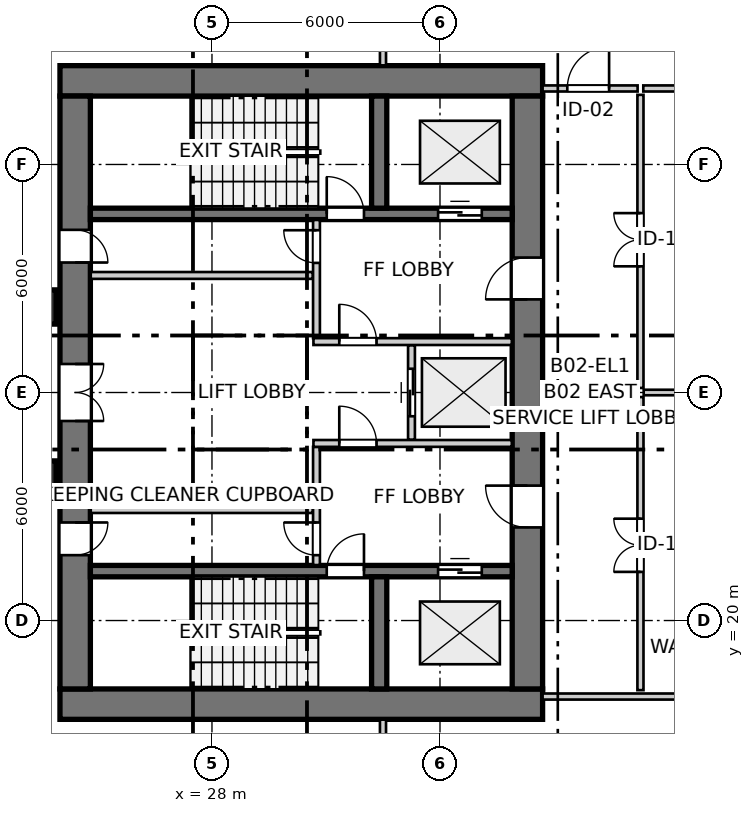
"""IFC4 building model, lengths in metres.
Left out: names, types, materials, properties, quantities, classifications, styles, units other than length and angle.
Written with IfcOpenShell. Run it as: python <this file> out.ifc"""

import sys

from ifc_helpers import new_model, si_unit, direction, frame, frame_2d, origin, origin_2d, place, context, subcontext, project, spatial, rectangle, extrude, source, transform, mapped, element, fill, save


model = new_model("IFC4")
c1 = context("Model", 3, precision=1e-05, world=origin(), true_north=direction((0.0, 1.0)))
c2 = subcontext(c1, "Body", "Model", "MODEL_VIEW")
j1 = project(units=[si_unit("LENGTHUNIT", "METRE"), si_unit("PLANEANGLEUNIT", "RADIAN")], contexts=[c1])
p1 = place(None, origin())
s1 = spatial("IfcSite", under=j1, at=p1, CompositionType="ELEMENT")
p2 = place(p1, origin())
s2 = spatial("IfcBuilding", under=s1, at=p2, CompositionType="ELEMENT")
p3 = place(p2, frame((0.0, 0.0, -8.7)))
s3 = spatial("IfcBuildingStorey", under=s2, at=p3, CompositionType="ELEMENT", Elevation=-8.7)
m1 = source(origin(), c2, "Body", "SweptSolid", [
    extrude(rectangle(XDim=0.9, YDim=0.9, at=origin_2d()), origin(), (0.0, 0.0, 1.0), 4.2),
])
for number, where, z_axis, x_axis in (
    (1, (23.45, 23.75, 0.0), (0.0, 0.0, 1.0), (1.0, 0.0, 0.0)),
    (2, (23.45, 28.25, 0.0), (0.0, 0.0, 1.0), (1.0, 0.0, 0.0)),
):
    element("IfcColumn", number, at=place(p3, frame(where, z_axis=z_axis, x_axis=x_axis)), inside=s3, PredefinedType="COLUMN", context=c2, shape_type="MappedRepresentation", body=[
        mapped(m1, transform((0.0, 0.0, 0.0), x_axis=(1.0, 0.0, 0.0), y_axis=(0.0, 1.0, 0.0), z_axis=(0.0, 0.0, 1.0), scale=1.0)),
    ])
for number, where, z_axis, x_axis in (
    (3, (24.0, 17.8, 0.0), (0.0, 0.0, 1.0), (1.0, 0.0, 0.0)),
    (4, (36.7, 34.2, 0.0), (0.0, 0.0, 1.0), (-1.0, 0.0, 0.0)),
):
    element("IfcWall", number, at=place(p3, frame(where, z_axis=z_axis, x_axis=x_axis)), inside=s3, PredefinedType="SHEAR", context=c2, shape_type="SweptSolid", body=[
        extrude(rectangle(XDim=12.7, YDim=0.8, at=frame_2d((6.35, 0.0))), origin(), (0.0, 0.0, 1.0), 4.2),
    ])
p4 = place(p3, frame((24.4, 33.8, 0.0), z_axis=(0.0, 0.0, 1.0), x_axis=(0.0, -1.0, 0.0)))
e5 = element("IfcWall", 5, at=p4, inside=s3, PredefinedType="SHEAR", context=c2, shape_type="SweptSolid", body=[
    extrude(rectangle(XDim=15.6, YDim=0.8, at=frame_2d((7.8, 0.0))), origin(), (0.0, 0.0, 1.0), 4.2),
])
p5 = place(p4, frame((7.05, 0.0, 0.0)))
e6 = element("IfcOpeningElement", 6, at=p5, cuts=e5, PredefinedType="OPENING", context=c2, shape_type="SweptSolid", body=[
    extrude(rectangle(XDim=1.5, YDim=2.15, at=frame_2d((0.75, 1.075))), frame((0.0, 0.41, 0.0), z_axis=(0.0, -1.0, 0.0), x_axis=(1.0, 0.0, 0.0)), (0.0, 0.0, 1.0), 0.82),
])
p6 = place(p4, frame((3.52, 0.0, 0.0)))
e7 = element("IfcOpeningElement", 7, at=p6, cuts=e5, PredefinedType="OPENING", context=c2, shape_type="SweptSolid", body=[
    extrude(rectangle(XDim=0.86, YDim=2.05, at=frame_2d((0.43, 1.025))), frame((0.0, 0.41, 0.0), z_axis=(0.0, -1.0, 0.0), x_axis=(1.0, 0.0, 0.0)), (0.0, 0.0, 1.0), 0.82),
])
p7 = place(p4, frame((11.22, 0.0, 0.0)))
e8 = element("IfcOpeningElement", 8, at=p7, cuts=e5, PredefinedType="OPENING", context=c2, shape_type="SweptSolid", body=[
    extrude(rectangle(XDim=0.86, YDim=2.05, at=frame_2d((0.43, 1.025))), frame((0.0, 0.41, 0.0), z_axis=(0.0, -1.0, 0.0), x_axis=(1.0, 0.0, 0.0)), (0.0, 0.0, 1.0), 0.82),
])
p8 = place(p3, frame((36.3, 18.2, 0.0), z_axis=(0.0, 0.0, 1.0), x_axis=(0.0, 1.0, 0.0)))
e9 = element("IfcWall", 9, at=p8, inside=s3, PredefinedType="SHEAR", context=c2, shape_type="SweptSolid", body=[
    extrude(rectangle(XDim=15.6, YDim=0.8, at=frame_2d((7.8, 0.0))), origin(), (0.0, 0.0, 1.0), 4.2),
])
p9 = place(p8, frame((4.25, 0.0, 0.0)))
e10 = element("IfcOpeningElement", 10, at=p9, cuts=e9, PredefinedType="OPENING", context=c2, shape_type="SweptSolid", body=[
    extrude(rectangle(XDim=1.1, YDim=2.15, at=frame_2d((0.55, 1.075))), frame((0.0, 0.41, 0.0), z_axis=(0.0, -1.0, 0.0), x_axis=(1.0, 0.0, 0.0)), (0.0, 0.0, 1.0), 0.82),
])
p10 = place(p8, frame((10.25, 0.0, 0.0)))
e11 = element("IfcOpeningElement", 11, at=p10, cuts=e9, PredefinedType="OPENING", context=c2, shape_type="SweptSolid", body=[
    extrude(rectangle(XDim=1.1, YDim=2.15, at=frame_2d((0.55, 1.075))), frame((0.0, 0.41, 0.0), z_axis=(0.0, -1.0, 0.0), x_axis=(1.0, 0.0, 0.0)), (0.0, 0.0, 1.0), 0.82),
])
p11 = place(p3, frame((24.8, 21.3, 0.0), z_axis=(0.0, 0.0, 1.0), x_axis=(1.0, 0.0, 0.0)))
e12 = element("IfcWall", 12, at=p11, inside=s3, PredefinedType="SHEAR", context=c2, shape_type="SweptSolid", body=[
    extrude(rectangle(XDim=11.1, YDim=0.3, at=frame_2d((5.55, 0.0))), origin(), (0.0, 0.0, 1.0), 4.2),
])
p12 = place(p11, frame((6.22, 0.0, 0.0)))
e13 = element("IfcOpeningElement", 13, at=p12, cuts=e12, PredefinedType="OPENING", context=c2, shape_type="SweptSolid", body=[
    extrude(rectangle(XDim=0.98, YDim=2.15, at=frame_2d((0.49, 1.075))), frame((0.0, 0.16, 0.0), z_axis=(0.0, -1.0, 0.0), x_axis=(1.0, 0.0, 0.0)), (0.0, 0.0, 1.0), 0.32),
])
p13 = place(p11, frame((9.15, 0.0, 0.0)))
e14 = element("IfcOpeningElement", 14, at=p13, cuts=e12, PredefinedType="OPENING", context=c2, shape_type="SweptSolid", body=[
    extrude(rectangle(XDim=1.15, YDim=2.15, at=frame_2d((0.575, 1.075))), frame((0.0, 0.16, 0.0), z_axis=(0.0, -1.0, 0.0), x_axis=(1.0, 0.0, 0.0)), (0.0, 0.0, 1.0), 0.32),
])
p14 = place(p3, frame((32.4, 18.2, 0.0), z_axis=(0.0, 0.0, 1.0), x_axis=(0.0, 1.0, 0.0)))
e15 = element("IfcWall", 15, at=p14, inside=s3, PredefinedType="SHEAR", context=c2, shape_type="SweptSolid", body=[
    extrude(rectangle(XDim=2.95, YDim=0.4, at=frame_2d((1.475, 0.0))), origin(), (0.0, 0.0, 1.0), 4.2),
])
p15 = place(p3, frame((24.8, 30.7, 0.0), z_axis=(0.0, 0.0, 1.0), x_axis=(1.0, 0.0, 0.0)))
e16 = element("IfcWall", 16, at=p15, inside=s3, PredefinedType="SHEAR", context=c2, shape_type="SweptSolid", body=[
    extrude(rectangle(XDim=11.1, YDim=0.3, at=frame_2d((5.55, 0.0))), origin(), (0.0, 0.0, 1.0), 4.2),
])
p16 = place(p15, frame((6.22, 0.0, 0.0)))
e17 = element("IfcOpeningElement", 17, at=p16, cuts=e16, PredefinedType="OPENING", context=c2, shape_type="SweptSolid", body=[
    extrude(rectangle(XDim=0.98, YDim=2.15, at=frame_2d((0.49, 1.075))), frame((0.0, 0.16, 0.0), z_axis=(0.0, -1.0, 0.0), x_axis=(1.0, 0.0, 0.0)), (0.0, 0.0, 1.0), 0.32),
])
p17 = place(p15, frame((9.15, 0.0, 0.0)))
e18 = element("IfcOpeningElement", 18, at=p17, cuts=e16, PredefinedType="OPENING", context=c2, shape_type="SweptSolid", body=[
    extrude(rectangle(XDim=1.15, YDim=2.15, at=frame_2d((0.575, 1.075))), frame((0.0, 0.16, 0.0), z_axis=(0.0, -1.0, 0.0), x_axis=(1.0, 0.0, 0.0)), (0.0, 0.0, 1.0), 0.32),
])
p18 = place(p3, frame((32.4, 30.85, 0.0), z_axis=(0.0, 0.0, 1.0), x_axis=(0.0, 1.0, 0.0)))
e19 = element("IfcWall", 19, at=p18, inside=s3, PredefinedType="SHEAR", context=c2, shape_type="SweptSolid", body=[
    extrude(rectangle(XDim=2.95, YDim=0.4, at=frame_2d((1.475, 0.0))), origin(), (0.0, 0.0, 1.0), 4.2),
])
p19 = place(p3, frame((30.75, 21.46, 0.0), z_axis=(0.0, 0.0, 1.0), x_axis=(0.0, 1.0, 0.0)))
e20 = element("IfcWall", 20, at=p19, inside=s3, PredefinedType="PARTITIONING", context=c2, shape_type="SweptSolid", body=[
    extrude(rectangle(XDim=3.11, YDim=0.18, at=frame_2d((1.555, 0.0))), origin(), (0.0, 0.0, 1.0), 4.2),
])
p20 = place(p19, frame((0.26, 0.0, 0.0)))
e21 = element("IfcOpeningElement", 21, at=p20, cuts=e20, PredefinedType="OPENING", context=c2, shape_type="SweptSolid", body=[
    extrude(rectangle(XDim=0.86, YDim=2.05, at=frame_2d((0.43, 1.025))), frame((0.0, 0.1, 0.0), z_axis=(0.0, -1.0, 0.0), x_axis=(1.0, 0.0, 0.0)), (0.0, 0.0, 1.0), 0.2),
])
p21 = place(p3, frame((30.67, 24.66, 0.0), z_axis=(0.0, 0.0, 1.0), x_axis=(1.0, 0.0, 0.0)))
e22 = element("IfcWall", 22, at=p21, inside=s3, PredefinedType="PARTITIONING", context=c2, shape_type="SweptSolid", body=[
    extrude(rectangle(XDim=5.22, YDim=0.18, at=frame_2d((2.61, 0.0))), origin(), (0.0, 0.0, 1.0), 4.2),
])
p22 = place(p21, frame((0.68, 0.0, 0.0)))
e23 = element("IfcOpeningElement", 23, at=p22, cuts=e22, PredefinedType="OPENING", context=c2, shape_type="SweptSolid", body=[
    extrude(rectangle(XDim=0.98, YDim=2.15, at=frame_2d((0.49, 1.075))), frame((0.0, 0.1, 0.0), z_axis=(0.0, -1.0, 0.0), x_axis=(1.0, 0.0, 0.0)), (0.0, 0.0, 1.0), 0.2),
])
p23 = place(p3, frame((30.75, 27.43, 0.0), z_axis=(0.0, 0.0, 1.0), x_axis=(0.0, 1.0, 0.0)))
e24 = element("IfcWall", 24, at=p23, inside=s3, PredefinedType="PARTITIONING", context=c2, shape_type="SweptSolid", body=[
    extrude(rectangle(XDim=3.11, YDim=0.18, at=frame_2d((1.555, 0.0))), origin(), (0.0, 0.0, 1.0), 4.2),
])
p24 = place(p23, frame((1.98, 0.0, 0.0)))
e25 = element("IfcOpeningElement", 25, at=p24, cuts=e24, PredefinedType="OPENING", context=c2, shape_type="SweptSolid", body=[
    extrude(rectangle(XDim=0.86, YDim=2.05, at=frame_2d((0.43, 1.025))), frame((0.0, 0.1, 0.0), z_axis=(0.0, -1.0, 0.0), x_axis=(1.0, 0.0, 0.0)), (0.0, 0.0, 1.0), 0.2),
])
p25 = place(p3, frame((30.67, 27.34, 0.0), z_axis=(0.0, 0.0, 1.0), x_axis=(1.0, 0.0, 0.0)))
e26 = element("IfcWall", 26, at=p25, inside=s3, PredefinedType="PARTITIONING", context=c2, shape_type="SweptSolid", body=[
    extrude(rectangle(XDim=5.22, YDim=0.18, at=frame_2d((2.61, 0.0))), origin(), (0.0, 0.0, 1.0), 4.2),
])
p26 = place(p25, frame((0.68, 0.0, 0.0)))
e27 = element("IfcOpeningElement", 27, at=p26, cuts=e26, PredefinedType="OPENING", context=c2, shape_type="SweptSolid", body=[
    extrude(rectangle(XDim=0.98, YDim=2.15, at=frame_2d((0.49, 1.075))), frame((0.0, 0.1, 0.0), z_axis=(0.0, -1.0, 0.0), x_axis=(1.0, 0.0, 0.0)), (0.0, 0.0, 1.0), 0.2),
])
p27 = place(p3, frame((33.25, 24.76, 0.0), z_axis=(0.0, 0.0, 1.0), x_axis=(0.0, 1.0, 0.0)))
e28 = element("IfcWall", 28, at=p27, inside=s3, PredefinedType="PARTITIONING", context=c2, shape_type="SweptSolid", body=[
    extrude(rectangle(XDim=2.48, YDim=0.18, at=frame_2d((1.24, 0.0))), origin(), (0.0, 0.0, 1.0), 4.2),
])
p28 = place(p27, frame((0.615, 0.0, 0.0)))
e29 = element("IfcOpeningElement", 29, at=p28, cuts=e28, PredefinedType="OPENING", context=c2, shape_type="SweptSolid", body=[
    extrude(rectangle(XDim=1.25, YDim=2.15, at=frame_2d((0.625, 1.075))), frame((0.0, 0.1, 0.0), z_axis=(0.0, -1.0, 0.0), x_axis=(1.0, 0.0, 0.0)), (0.0, 0.0, 1.0), 0.2),
])
for number, where, z_axis, x_axis in (
    (30, (24.81, 22.92, 0.0), (0.0, 0.0, 1.0), (1.0, 0.0, 0.0)),
    (31, (24.81, 29.08, 0.0), (0.0, 0.0, 1.0), (1.0, 0.0, 0.0)),
):
    element("IfcWall", number, at=place(p3, frame(where, z_axis=z_axis, x_axis=x_axis)), inside=s3, PredefinedType="PARTITIONING", context=c2, shape_type="SweptSolid", body=[
        extrude(rectangle(XDim=5.84, YDim=0.18, at=frame_2d((2.92, 0.0))), origin(), (0.0, 0.0, 1.0), 4.2),
    ])
for number, where, z_axis, x_axis in (
    (32, (32.5, 15.588, 0.0), (0.0, 0.0, 1.0), (0.0, 1.0, 0.0)),
    (33, (32.5, 34.608, 0.0), (0.0, 0.0, 1.0), (0.0, 1.0, 0.0)),
):
    element("IfcWall", number, at=place(p3, frame(where, z_axis=z_axis, x_axis=x_axis)), inside=s3, PredefinedType="PARTITIONING", context=c2, shape_type="SweptSolid", body=[
        extrude(rectangle(XDim=1.804, YDim=0.16, at=frame_2d((0.902, 0.0))), origin(), (0.0, 0.0, 1.0), 4.2),
    ])
p29 = place(p3, frame((36.7, 18.0, 0.0), z_axis=(0.0, 0.0, 1.0), x_axis=(1.0, 0.0, 0.0)))
e34 = element("IfcWall", 34, at=p29, inside=s3, PredefinedType="PARTITIONING", context=c2, shape_type="SweptSolid", body=[
    extrude(rectangle(XDim=9.7, YDim=0.16, at=frame_2d((4.85, 0.0))), origin(), (0.0, 0.0, 1.0), 4.2),
])
p30 = place(p3, frame((36.7, 34.0, 0.0), z_axis=(0.0, 0.0, 1.0), x_axis=(1.0, 0.0, 0.0)))
e35 = element("IfcWall", 35, at=p30, inside=s3, PredefinedType="PARTITIONING", context=c2, shape_type="SweptSolid", body=[
    extrude(rectangle(XDim=2.5, YDim=0.16, at=frame_2d((1.25, 0.0))), origin(), (0.0, 0.0, 1.0), 4.2),
])
p31 = place(p30, frame((0.65, 0.0, 0.0)))
e36 = element("IfcOpeningElement", 36, at=p31, cuts=e35, PredefinedType="OPENING", context=c2, shape_type="SweptSolid", body=[
    extrude(rectangle(XDim=1.1, YDim=2.15, at=frame_2d((0.55, 1.075))), frame((0.0, 0.09, 0.0), z_axis=(0.0, -1.0, 0.0), x_axis=(1.0, 0.0, 0.0)), (0.0, 0.0, 1.0), 0.18),
])
p32 = place(p3, frame((39.35, 34.0, 0.0), z_axis=(0.0, 0.0, 1.0), x_axis=(1.0, 0.0, 0.0)))
e37 = element("IfcWall", 37, at=p32, inside=s3, PredefinedType="PARTITIONING", context=c2, shape_type="SweptSolid", body=[
    extrude(rectangle(XDim=7.05, YDim=0.16, at=frame_2d((3.525, 0.0))), origin(), (0.0, 0.0, 1.0), 4.2),
])
p33 = place(p3, frame((39.275, 18.168, 0.0), z_axis=(0.0, 0.0, 1.0), x_axis=(0.0, 1.0, 0.0)))
e38 = element("IfcWall", 38, at=p33, inside=s3, PredefinedType="PARTITIONING", context=c2, shape_type="SweptSolid", body=[
    extrude(rectangle(XDim=7.712, YDim=0.16, at=frame_2d((3.856, 0.0))), origin(), (0.0, 0.0, 1.0), 4.2),
])
p34 = place(p33, frame((3.112, 0.0, 0.0)))
e39 = element("IfcOpeningElement", 39, at=p34, cuts=e38, PredefinedType="OPENING", context=c2, shape_type="SweptSolid", body=[
    extrude(rectangle(XDim=1.4, YDim=2.15, at=frame_2d((0.7, 1.075))), frame((0.0, 0.09, 0.0), z_axis=(0.0, -1.0, 0.0), x_axis=(1.0, 0.0, 0.0)), (0.0, 0.0, 1.0), 0.18),
])
p35 = place(p3, frame((39.275, 26.12, 0.0), z_axis=(0.0, 0.0, 1.0), x_axis=(0.0, 1.0, 0.0)))
e40 = element("IfcWall", 40, at=p35, inside=s3, PredefinedType="PARTITIONING", context=c2, shape_type="SweptSolid", body=[
    extrude(rectangle(XDim=7.712, YDim=0.16, at=frame_2d((3.856, 0.0))), origin(), (0.0, 0.0, 1.0), 4.2),
])
p36 = place(p35, frame((3.2, 0.0, 0.0)))
e41 = element("IfcOpeningElement", 41, at=p36, cuts=e40, PredefinedType="OPENING", context=c2, shape_type="SweptSolid", body=[
    extrude(rectangle(XDim=1.4, YDim=2.15, at=frame_2d((0.7, 1.075))), frame((0.0, 0.09, 0.0), z_axis=(0.0, -1.0, 0.0), x_axis=(1.0, 0.0, 0.0)), (0.0, 0.0, 1.0), 0.18),
])
p37 = place(p3, frame((39.36, 26.0, 0.0), z_axis=(0.0, 0.0, 1.0), x_axis=(1.0, 0.0, 0.0)))
e42 = element("IfcWall", 42, at=p37, inside=s3, PredefinedType="PARTITIONING", context=c2, shape_type="SweptSolid", body=[
    extrude(rectangle(XDim=6.96, YDim=0.145, at=frame_2d((3.48, 0.0))), origin(), (0.0, 0.0, 1.0), 4.2),
])
m2 = source(origin(), c2, "Body", "SweptSolid", [
    extrude(rectangle(XDim=0.98, YDim=2.15, at=frame_2d((0.49, 1.075))), frame((0.0, 0.025, 0.0), z_axis=(0.0, -1.0, 0.0), x_axis=(1.0, 0.0, 0.0)), (0.0, 0.0, 1.0), 0.05),
])
p38 = place(p12, origin())
e43 = element("IfcDoor", 43, at=p38, inside=s3, OperationType="SINGLE_SWING_RIGHT", PredefinedType="DOOR", context=c2, shape_type="MappedRepresentation", body=[
    mapped(m2, transform((0.0, 0.0, 0.0), x_axis=(1.0, 0.0, 0.0), y_axis=(0.0, 1.0, 0.0), z_axis=(0.0, 0.0, 1.0), scale=1.0)),
])
fill(e13, e43)
m3 = source(origin(), c2, "Body", "SweptSolid", [
    extrude(rectangle(XDim=1.15, YDim=2.15, at=frame_2d((0.575, 1.075))), frame((0.0, 0.025, 0.0), z_axis=(0.0, -1.0, 0.0), x_axis=(1.0, 0.0, 0.0)), (0.0, 0.0, 1.0), 0.05),
])
p39 = place(p13, origin())
e44 = element("IfcDoor", 44, at=p39, inside=s3, OperationType="DOUBLE_DOOR_SLIDING", PredefinedType="DOOR", context=c2, shape_type="MappedRepresentation", body=[
    mapped(m3, transform((0.0, 0.0, 0.0), x_axis=(1.0, 0.0, 0.0), y_axis=(0.0, 1.0, 0.0), z_axis=(0.0, 0.0, 1.0), scale=1.0)),
])
fill(e14, e44)
p40 = place(p16, origin())
e45 = element("IfcDoor", 45, at=p40, inside=s3, OperationType="SINGLE_SWING_LEFT", PredefinedType="DOOR", context=c2, shape_type="MappedRepresentation", body=[
    mapped(m2, transform((0.0, 0.0, 0.0), x_axis=(1.0, 0.0, 0.0), y_axis=(0.0, 1.0, 0.0), z_axis=(0.0, 0.0, 1.0), scale=1.0)),
])
fill(e17, e45)
p41 = place(p17, origin())
e46 = element("IfcDoor", 46, at=p41, inside=s3, OperationType="DOUBLE_DOOR_SLIDING", PredefinedType="DOOR", context=c2, shape_type="MappedRepresentation", body=[
    mapped(m3, transform((0.0, 0.0, 0.0), x_axis=(1.0, 0.0, 0.0), y_axis=(0.0, 1.0, 0.0), z_axis=(0.0, 0.0, 1.0), scale=1.0)),
])
fill(e18, e46)
m4 = source(origin(), c2, "Body", "SweptSolid", [
    extrude(rectangle(XDim=1.1, YDim=2.15, at=frame_2d((0.55, 1.075))), frame((0.0, 0.025, 0.0), z_axis=(0.0, -1.0, 0.0), x_axis=(1.0, 0.0, 0.0)), (0.0, 0.0, 1.0), 0.05),
])
p42 = place(p9, origin())
e47 = element("IfcDoor", 47, at=p42, inside=s3, OperationType="SINGLE_SWING_RIGHT", PredefinedType="DOOR", context=c2, shape_type="MappedRepresentation", body=[
    mapped(m4, transform((0.0, 0.0, 0.0), x_axis=(1.0, 0.0, 0.0), y_axis=(0.0, 1.0, 0.0), z_axis=(0.0, 0.0, 1.0), scale=1.0)),
])
fill(e10, e47)
p43 = place(p10, origin())
e48 = element("IfcDoor", 48, at=p43, inside=s3, OperationType="SINGLE_SWING_LEFT", PredefinedType="DOOR", context=c2, shape_type="MappedRepresentation", body=[
    mapped(m4, transform((0.0, 0.0, 0.0), x_axis=(1.0, 0.0, 0.0), y_axis=(0.0, 1.0, 0.0), z_axis=(0.0, 0.0, 1.0), scale=1.0)),
])
fill(e11, e48)
m5 = source(origin(), c2, "Body", "SweptSolid", [
    extrude(rectangle(XDim=1.5, YDim=2.15, at=frame_2d((0.75, 1.075))), frame((0.0, 0.025, 0.0), z_axis=(0.0, -1.0, 0.0), x_axis=(1.0, 0.0, 0.0)), (0.0, 0.0, 1.0), 0.05),
])
p44 = place(p5, origin())
e49 = element("IfcDoor", 49, at=p44, inside=s3, OperationType="DOUBLE_DOOR_SINGLE_SWING", PredefinedType="DOOR", context=c2, shape_type="MappedRepresentation", body=[
    mapped(m5, transform((0.0, 0.0, 0.0), x_axis=(1.0, 0.0, 0.0), y_axis=(0.0, 1.0, 0.0), z_axis=(0.0, 0.0, 1.0), scale=1.0)),
])
fill(e6, e49)
m6 = source(origin(), c2, "Body", "SweptSolid", [
    extrude(rectangle(XDim=0.86, YDim=2.05, at=frame_2d((0.43, 1.025))), frame((0.0, 0.025, 0.0), z_axis=(0.0, -1.0, 0.0), x_axis=(1.0, 0.0, 0.0)), (0.0, 0.0, 1.0), 0.05),
])
p45 = place(p6, origin())
e50 = element("IfcDoor", 50, at=p45, inside=s3, OperationType="SINGLE_SWING_RIGHT", PredefinedType="DOOR", context=c2, shape_type="MappedRepresentation", body=[
    mapped(m6, transform((0.0, 0.0, 0.0), x_axis=(1.0, 0.0, 0.0), y_axis=(0.0, 1.0, 0.0), z_axis=(0.0, 0.0, 1.0), scale=1.0)),
])
fill(e7, e50)
p46 = place(p7, origin())
e51 = element("IfcDoor", 51, at=p46, inside=s3, OperationType="SINGLE_SWING_LEFT", PredefinedType="DOOR", context=c2, shape_type="MappedRepresentation", body=[
    mapped(m6, transform((0.0, 0.0, 0.0), x_axis=(1.0, 0.0, 0.0), y_axis=(0.0, 1.0, 0.0), z_axis=(0.0, 0.0, 1.0), scale=1.0)),
])
fill(e8, e51)
p47 = place(p20, origin())
e52 = element("IfcDoor", 52, at=p47, inside=s3, OperationType="SINGLE_SWING_RIGHT", PredefinedType="DOOR", context=c2, shape_type="MappedRepresentation", body=[
    mapped(m6, transform((0.0, 0.0, 0.0), x_axis=(1.0, 0.0, 0.0), y_axis=(0.0, 1.0, 0.0), z_axis=(0.0, 0.0, 1.0), scale=1.0)),
])
fill(e21, e52)
p48 = place(p22, origin())
e53 = element("IfcDoor", 53, at=p48, inside=s3, OperationType="SINGLE_SWING_LEFT", PredefinedType="DOOR", context=c2, shape_type="MappedRepresentation", body=[
    mapped(m2, transform((0.0, 0.0, 0.0), x_axis=(1.0, 0.0, 0.0), y_axis=(0.0, 1.0, 0.0), z_axis=(0.0, 0.0, 1.0), scale=1.0)),
])
fill(e23, e53)
p49 = place(p24, origin())
e54 = element("IfcDoor", 54, at=p49, inside=s3, OperationType="SINGLE_SWING_RIGHT", PredefinedType="DOOR", context=c2, shape_type="MappedRepresentation", body=[
    mapped(m6, transform((0.0, 0.0, 0.0), x_axis=(1.0, 0.0, 0.0), y_axis=(0.0, 1.0, 0.0), z_axis=(0.0, 0.0, 1.0), scale=1.0)),
])
fill(e25, e54)
p50 = place(p26, origin())
e55 = element("IfcDoor", 55, at=p50, inside=s3, OperationType="SINGLE_SWING_LEFT", PredefinedType="DOOR", context=c2, shape_type="MappedRepresentation", body=[
    mapped(m2, transform((0.0, 0.0, 0.0), x_axis=(1.0, 0.0, 0.0), y_axis=(0.0, 1.0, 0.0), z_axis=(0.0, 0.0, 1.0), scale=1.0)),
])
fill(e27, e55)
m7 = source(origin(), c2, "Body", "SweptSolid", [
    extrude(rectangle(XDim=1.25, YDim=2.15, at=frame_2d((0.625, 1.075))), frame((0.0, 0.025, 0.0), z_axis=(0.0, -1.0, 0.0), x_axis=(1.0, 0.0, 0.0)), (0.0, 0.0, 1.0), 0.05),
])
p51 = place(p28, origin())
e56 = element("IfcDoor", 56, at=p51, inside=s3, OperationType="DOUBLE_DOOR_SLIDING", PredefinedType="DOOR", context=c2, shape_type="MappedRepresentation", body=[
    mapped(m7, transform((0.0, 0.0, 0.0), x_axis=(1.0, 0.0, 0.0), y_axis=(0.0, 1.0, 0.0), z_axis=(0.0, 0.0, 1.0), scale=1.0)),
])
fill(e29, e56)
p52 = place(p31, origin())
e57 = element("IfcDoor", 57, at=p52, inside=s3, OperationType="SINGLE_SWING_RIGHT", PredefinedType="DOOR", context=c2, shape_type="MappedRepresentation", body=[
    mapped(m4, transform((0.0, 0.0, 0.0), x_axis=(1.0, 0.0, 0.0), y_axis=(0.0, 1.0, 0.0), z_axis=(0.0, 0.0, 1.0), scale=1.0)),
])
fill(e36, e57)
m8 = source(origin(), c2, "Body", "SweptSolid", [
    extrude(rectangle(XDim=1.4, YDim=2.15, at=frame_2d((0.7, 1.075))), frame((0.0, 0.025, 0.0), z_axis=(0.0, -1.0, 0.0), x_axis=(1.0, 0.0, 0.0)), (0.0, 0.0, 1.0), 0.05),
])
p53 = place(p34, origin())
e58 = element("IfcDoor", 58, at=p53, inside=s3, OperationType="DOUBLE_DOOR_SINGLE_SWING", PredefinedType="DOOR", context=c2, shape_type="MappedRepresentation", body=[
    mapped(m8, transform((0.0, 0.0, 0.0), x_axis=(1.0, 0.0, 0.0), y_axis=(0.0, 1.0, 0.0), z_axis=(0.0, 0.0, 1.0), scale=1.0)),
])
fill(e39, e58)
p54 = place(p36, origin())
e59 = element("IfcDoor", 59, at=p54, inside=s3, OperationType="DOUBLE_DOOR_SINGLE_SWING", PredefinedType="DOOR", context=c2, shape_type="MappedRepresentation", body=[
    mapped(m8, transform((0.0, 0.0, 0.0), x_axis=(1.0, 0.0, 0.0), y_axis=(0.0, 1.0, 0.0), z_axis=(0.0, 0.0, 1.0), scale=1.0)),
])
fill(e41, e59)
save(model, sys.argv[1])
